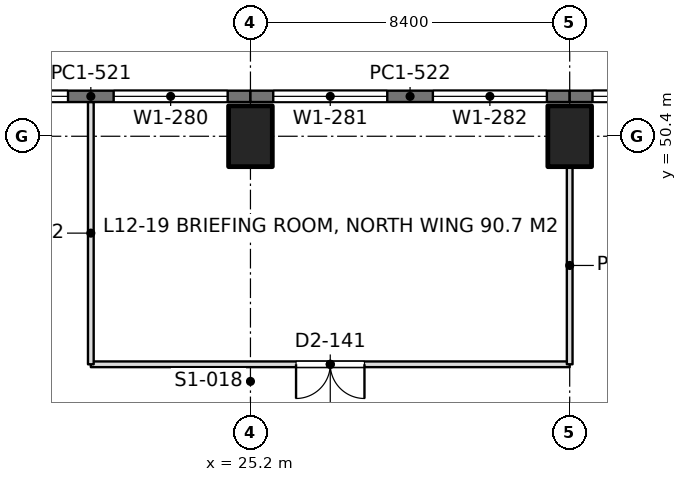
"""IFC4 building model, lengths in metres.
Left out: names, types, materials, properties, quantities, classifications, styles, units other than length and angle.
Written with IfcOpenShell. Run it as: python <this file> out.ifc"""

import sys

from ifc_helpers import new_model, si_unit, direction, frame, frame_2d, origin, origin_2d, place, context, subcontext, project, spatial, rectangle, extrude, element, fill, save


model = new_model("IFC4")
c1 = context("Model", 3, precision=1e-05, world=origin(), true_north=direction((0.0, 1.0)))
c2 = subcontext(c1, "Body", "Model", "MODEL_VIEW")
j1 = project(units=[si_unit("LENGTHUNIT", "METRE"), si_unit("PLANEANGLEUNIT", "RADIAN")], contexts=[c1])
p1 = place(None, origin())
s1 = spatial("IfcSite", under=j1, at=p1, CompositionType="ELEMENT")
p2 = place(p1, origin())
s2 = spatial("IfcBuilding", under=s1, at=p2, CompositionType="ELEMENT")
p3 = place(p2, frame((0.0, 0.0, 54.9)))
s3 = spatial("IfcBuildingStorey", under=s2, at=p3, CompositionType="ELEMENT", Elevation=54.9)
for number, where, z_axis, x_axis in (
    (1, (25.2, 50.4, 0.0), (0.0, 0.0, 1.0), (1.0, 0.0, 0.0)),
    (2, (33.6, 50.4, 0.0), (0.0, 0.0, 1.0), (1.0, 0.0, 0.0)),
):
    element("IfcColumn", number, at=place(p3, frame(where, z_axis=z_axis, x_axis=x_axis)), inside=s3, PredefinedType="COLUMN", context=c2, shape_type="SweptSolid", body=[
        extrude(rectangle(XDim=1.15, YDim=1.6, at=origin_2d()), origin(), (0.0, 0.0, 1.0), 4.5),
    ])
p4 = place(p3, frame((16.8, 51.45, 0.0), z_axis=(0.0, 0.0, 1.0), x_axis=(1.0, 0.0, 0.0)))
e3 = element("IfcWall", 3, at=p4, inside=s3, PredefinedType="SOLIDWALL", context=c2, shape_type="SweptSolid", body=[
    extrude(rectangle(XDim=8.4, YDim=0.3, at=frame_2d((4.2, 0.0))), origin(), (0.0, 0.0, 1.0), 4.34),
])
p5 = place(p4, frame((0.6, 0.0, 0.9)))
e4 = element("IfcOpeningElement", 4, at=p5, cuts=e3, PredefinedType="OPENING", context=c2, shape_type="SweptSolid", body=[
    extrude(rectangle(XDim=3.0, YDim=1.9, at=frame_2d((1.5, 0.95))), frame((0.0, 0.16, 0.0), z_axis=(0.0, -1.0, 0.0), x_axis=(1.0, 0.0, 0.0)), (0.0, 0.0, 1.0), 0.32),
])
p6 = place(p4, frame((4.8, 0.0, 0.9)))
e5 = element("IfcOpeningElement", 5, at=p6, cuts=e3, PredefinedType="OPENING", context=c2, shape_type="SweptSolid", body=[
    extrude(rectangle(XDim=3.0, YDim=1.9, at=frame_2d((1.5, 0.95))), frame((0.0, 0.16, 0.0), z_axis=(0.0, -1.0, 0.0), x_axis=(1.0, 0.0, 0.0)), (0.0, 0.0, 1.0), 0.32),
])
p7 = place(p3, frame((25.2, 51.45, 0.0), z_axis=(0.0, 0.0, 1.0), x_axis=(1.0, 0.0, 0.0)))
e6 = element("IfcWall", 6, at=p7, inside=s3, PredefinedType="SOLIDWALL", context=c2, shape_type="SweptSolid", body=[
    extrude(rectangle(XDim=8.4, YDim=0.3, at=frame_2d((4.2, 0.0))), origin(), (0.0, 0.0, 1.0), 4.34),
])
p8 = place(p7, frame((0.6, 0.0, 0.9)))
e7 = element("IfcOpeningElement", 7, at=p8, cuts=e6, PredefinedType="OPENING", context=c2, shape_type="SweptSolid", body=[
    extrude(rectangle(XDim=3.0, YDim=1.9, at=frame_2d((1.5, 0.95))), frame((0.0, 0.16, 0.0), z_axis=(0.0, -1.0, 0.0), x_axis=(1.0, 0.0, 0.0)), (0.0, 0.0, 1.0), 0.32),
])
p9 = place(p7, frame((4.8, 0.0, 0.9)))
e8 = element("IfcOpeningElement", 8, at=p9, cuts=e6, PredefinedType="OPENING", context=c2, shape_type="SweptSolid", body=[
    extrude(rectangle(XDim=3.0, YDim=1.9, at=frame_2d((1.5, 0.95))), frame((0.0, 0.16, 0.0), z_axis=(0.0, -1.0, 0.0), x_axis=(1.0, 0.0, 0.0)), (0.0, 0.0, 1.0), 0.32),
])
p10 = place(p3, frame((33.6, 51.45, 0.0), z_axis=(0.0, 0.0, 1.0), x_axis=(1.0, 0.0, 0.0)))
e9 = element("IfcWall", 9, at=p10, inside=s3, PredefinedType="SOLIDWALL", context=c2, shape_type="SweptSolid", body=[
    extrude(rectangle(XDim=8.4, YDim=0.3, at=frame_2d((4.2, 0.0))), origin(), (0.0, 0.0, 1.0), 4.34),
])
p11 = place(p10, frame((0.6, 0.0, 0.9)))
e10 = element("IfcOpeningElement", 10, at=p11, cuts=e9, PredefinedType="OPENING", context=c2, shape_type="SweptSolid", body=[
    extrude(rectangle(XDim=3.0, YDim=1.9, at=frame_2d((1.5, 0.95))), frame((0.0, 0.16, 0.0), z_axis=(0.0, -1.0, 0.0), x_axis=(1.0, 0.0, 0.0)), (0.0, 0.0, 1.0), 0.32),
])
p12 = place(p10, frame((4.8, 0.0, 0.9)))
e11 = element("IfcOpeningElement", 11, at=p12, cuts=e9, PredefinedType="OPENING", context=c2, shape_type="SweptSolid", body=[
    extrude(rectangle(XDim=3.0, YDim=1.9, at=frame_2d((1.5, 0.95))), frame((0.0, 0.16, 0.0), z_axis=(0.0, -1.0, 0.0), x_axis=(1.0, 0.0, 0.0)), (0.0, 0.0, 1.0), 0.32),
])
p13 = place(p3, frame((21.0, 44.4, 0.0), z_axis=(0.0, 0.0, 1.0), x_axis=(1.0, 0.0, 0.0)))
e12 = element("IfcWall", 12, at=p13, inside=s3, PredefinedType="PARTITIONING", context=c2, shape_type="SweptSolid", body=[
    extrude(rectangle(XDim=12.6, YDim=0.15, at=frame_2d((6.3, 0.0))), origin(), (0.0, 0.0, 1.0), 3.74),
])
p14 = place(p13, frame((5.4, 0.0, 0.0)))
e13 = element("IfcOpeningElement", 13, at=p14, cuts=e12, PredefinedType="OPENING", context=c2, shape_type="SweptSolid", body=[
    extrude(rectangle(XDim=1.8, YDim=2.2, at=frame_2d((0.9, 1.1))), frame((0.0, 0.085, 0.0), z_axis=(0.0, -1.0, 0.0), x_axis=(1.0, 0.0, 0.0)), (0.0, 0.0, 1.0), 0.17),
])
p15 = place(p3, frame((21.0, 44.4, 0.0), z_axis=(0.0, 0.0, 1.0), x_axis=(0.0, 1.0, 0.0)))
e14 = element("IfcWall", 14, at=p15, inside=s3, PredefinedType="PARTITIONING", context=c2, shape_type="SweptSolid", body=[
    extrude(rectangle(XDim=6.902, YDim=0.15, at=frame_2d((3.451, 0.0))), origin(), (0.0, 0.0, 1.0), 3.84),
])
p16 = place(p3, frame((33.6, 44.4, 0.0), z_axis=(0.0, 0.0, 1.0), x_axis=(0.0, 1.0, 0.0)))
e15 = element("IfcWall", 15, at=p16, inside=s3, PredefinedType="PARTITIONING", context=c2, shape_type="SweptSolid", body=[
    extrude(rectangle(XDim=5.201, YDim=0.15, at=frame_2d((2.601, 0.0))), origin(), (0.0, 0.0, 1.0), 3.74),
])
p17 = place(p5, origin())
e16 = element("IfcWindow", 16, at=p17, inside=s3, PartitioningType="SINGLE_PANEL", PredefinedType="WINDOW", context=c2, shape_type="SweptSolid", body=[
    extrude(rectangle(XDim=3.0, YDim=1.9, at=frame_2d((1.5, 0.95))), frame((0.0, 0.03, 0.0), z_axis=(0.0, -1.0, 0.0), x_axis=(1.0, 0.0, 0.0)), (0.0, 0.0, 1.0), 0.06),
])
fill(e4, e16)
p18 = place(p6, origin())
e17 = element("IfcWindow", 17, at=p18, inside=s3, PartitioningType="SINGLE_PANEL", PredefinedType="WINDOW", context=c2, shape_type="SweptSolid", body=[
    extrude(rectangle(XDim=3.0, YDim=1.9, at=frame_2d((1.5, 0.95))), frame((0.0, 0.03, 0.0), z_axis=(0.0, -1.0, 0.0), x_axis=(1.0, 0.0, 0.0)), (0.0, 0.0, 1.0), 0.06),
])
fill(e5, e17)
p19 = place(p8, origin())
e18 = element("IfcWindow", 18, at=p19, inside=s3, PartitioningType="SINGLE_PANEL", PredefinedType="WINDOW", context=c2, shape_type="SweptSolid", body=[
    extrude(rectangle(XDim=3.0, YDim=1.9, at=frame_2d((1.5, 0.95))), frame((0.0, 0.03, 0.0), z_axis=(0.0, -1.0, 0.0), x_axis=(1.0, 0.0, 0.0)), (0.0, 0.0, 1.0), 0.06),
])
fill(e7, e18)
p20 = place(p9, origin())
e19 = element("IfcWindow", 19, at=p20, inside=s3, PartitioningType="SINGLE_PANEL", PredefinedType="WINDOW", context=c2, shape_type="SweptSolid", body=[
    extrude(rectangle(XDim=3.0, YDim=1.9, at=frame_2d((1.5, 0.95))), frame((0.0, 0.03, 0.0), z_axis=(0.0, -1.0, 0.0), x_axis=(1.0, 0.0, 0.0)), (0.0, 0.0, 1.0), 0.06),
])
fill(e8, e19)
p21 = place(p11, origin())
e20 = element("IfcWindow", 20, at=p21, inside=s3, PartitioningType="SINGLE_PANEL", PredefinedType="WINDOW", context=c2, shape_type="SweptSolid", body=[
    extrude(rectangle(XDim=3.0, YDim=1.9, at=frame_2d((1.5, 0.95))), frame((0.0, 0.03, 0.0), z_axis=(0.0, -1.0, 0.0), x_axis=(1.0, 0.0, 0.0)), (0.0, 0.0, 1.0), 0.06),
])
fill(e10, e20)
p22 = place(p14, frame((1.8, 0.0, 0.0), z_axis=(0.0, 0.0, 1.0), x_axis=(-1.0, 0.0, 0.0)))
e21 = element("IfcDoor", 21, at=p22, inside=s3, OperationType="DOUBLE_DOOR_SINGLE_SWING", PredefinedType="DOOR", context=c2, shape_type="SweptSolid", body=[
    extrude(rectangle(XDim=1.8, YDim=2.2, at=frame_2d((0.9, 1.1))), frame((0.0, 0.025, 0.0), z_axis=(0.0, -1.0, 0.0), x_axis=(1.0, 0.0, 0.0)), (0.0, 0.0, 1.0), 0.05),
])
fill(e13, e21)
save(model, sys.argv[1])
